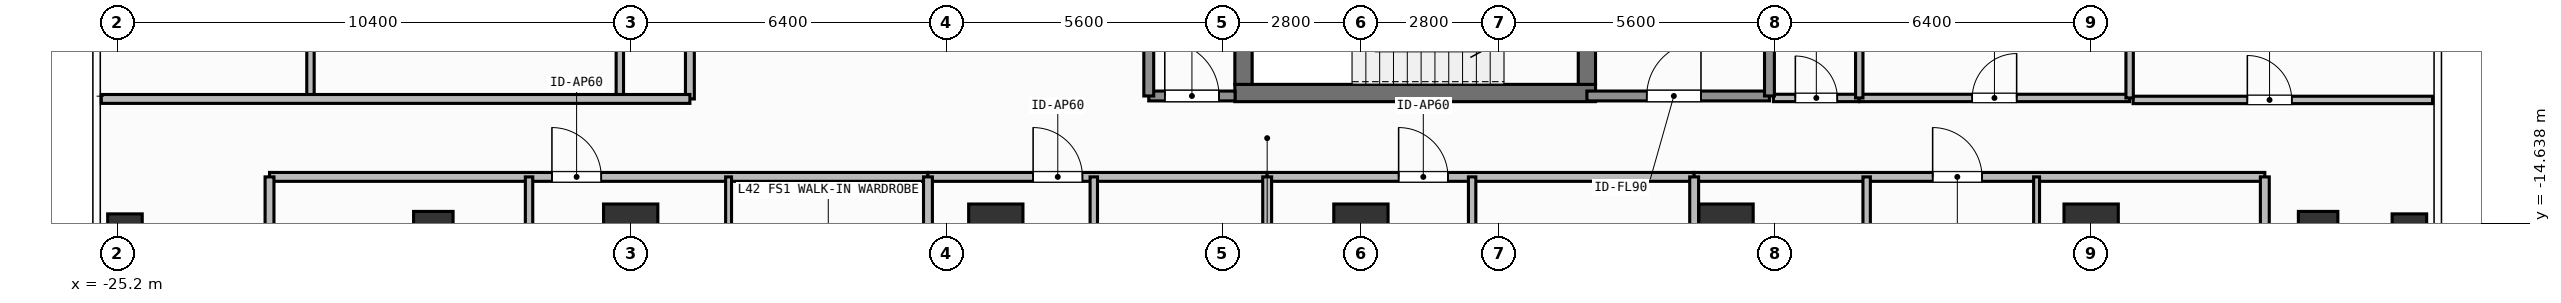
"""IFC4 building model, lengths in metres.
Left out: names, types, materials, properties, quantities, classifications, styles, units other than length and angle.
Written with IfcOpenShell. Run it as: python <this file> out.ifc"""

import sys

from ifc_helpers import new_model, si_unit, direction, frame, frame_2d, origin, origin_2d, place, context, subcontext, project, spatial, rectangle, hollow_rectangle, extrude, element, fill, save


model = new_model("IFC4")
c1 = context("Model", 3, precision=1e-05, world=origin(), true_north=direction((0.0, 1.0)))
c2 = subcontext(c1, "Body", "Model", "MODEL_VIEW")
j1 = project(units=[si_unit("LENGTHUNIT", "METRE"), si_unit("PLANEANGLEUNIT", "RADIAN")], contexts=[c1])
p1 = place(None, origin())
s1 = spatial("IfcSite", under=j1, at=p1, CompositionType="ELEMENT")
p2 = place(p1, origin())
s2 = spatial("IfcBuilding", under=s1, at=p2, CompositionType="ELEMENT")
p3 = place(p2, frame((0.0, 0.0, 171.9)))
s3 = spatial("IfcBuildingStorey", under=s2, at=p3, CompositionType="ELEMENT", Elevation=171.9)
p4 = place(p3, frame((-2.555, -12.0, 0.0), z_axis=(0.0, 0.0, 1.0), x_axis=(1.0, 0.0, 0.0)))
e1 = element("IfcWall", 1, at=p4, inside=s3, PredefinedType="SHEAR", context=c2, shape_type="SweptSolid", body=[
    extrude(rectangle(XDim=7.31, YDim=0.35, at=frame_2d((3.655, 0.0))), origin(), (0.0, 0.0, 1.0), 3.9),
])
p5 = place(p3, frame((-2.38, -11.825, 0.0), z_axis=(0.0, 0.0, 1.0), x_axis=(0.0, 1.0, 0.0)))
e2 = element("IfcWall", 2, at=p5, inside=s3, PredefinedType="SHEAR", context=c2, shape_type="SweptSolid", body=[
    extrude(rectangle(XDim=2.925, YDim=0.35, at=frame_2d((1.462, 0.0))), origin(), (0.0, 0.0, 1.0), 3.9),
])
p6 = place(p3, frame((4.58, -8.9, 0.0), z_axis=(0.0, 0.0, 1.0), x_axis=(0.0, -1.0, 0.0)))
e3 = element("IfcWall", 3, at=p6, inside=s3, PredefinedType="SHEAR", context=c2, shape_type="SweptSolid", body=[
    extrude(rectangle(XDim=2.925, YDim=0.35, at=frame_2d((1.462, 0.0))), origin(), (0.0, 0.0, 1.0), 3.9),
])
p7 = place(p6, frame((0.913, 0.0, 0.0)))
e4 = element("IfcOpeningElement", 4, at=p7, cuts=e3, PredefinedType="OPENING", context=c2, shape_type="SweptSolid", body=[
    extrude(rectangle(XDim=1.1, YDim=2.15, at=frame_2d((0.55, 1.075))), frame((0.0, 0.185, 0.0), z_axis=(0.0, -1.0, 0.0), x_axis=(1.0, 0.0, 0.0)), (0.0, 0.0, 1.0), 0.37),
])
for number, where, z_axis, x_axis in (
    (5, (-14.8, -14.8, 0.0), (0.0, 0.0, 1.0), (1.0, 0.0, 0.0)),
    (6, (-7.4, -14.8, 0.0), (0.0, 0.0, 1.0), (1.0, 0.0, 0.0)),
    (7, (0.0, -14.8, 0.0), (0.0, 0.0, 1.0), (1.0, 0.0, 0.0)),
    (8, (7.4, -14.8, 0.0), (0.0, 0.0, 1.0), (1.0, 0.0, 0.0)),
    (9, (14.8, -14.8, 0.0), (0.0, 0.0, 1.0), (1.0, 0.0, 0.0)),
):
    element("IfcColumn", number, at=place(p3, frame(where, z_axis=z_axis, x_axis=x_axis)), inside=s3, PredefinedType="COLUMN", context=c2, shape_type="SweptSolid", body=[
        extrude(rectangle(XDim=1.1, YDim=1.1, at=origin_2d()), origin(), (0.0, 0.0, 1.0), 3.9),
    ])
for number, where, z_axis, x_axis in (
    (10, (-18.8, -14.8, 0.0), (0.0, 0.0, 1.0), (1.0, 0.0, 0.0)),
    (11, (19.4, -14.8, 0.0), (0.0, 0.0, 1.0), (1.0, 0.0, 0.0)),
):
    element("IfcColumn", number, at=place(p3, frame(where, z_axis=z_axis, x_axis=x_axis)), inside=s3, PredefinedType="COLUMN", context=c2, shape_type="SweptSolid", body=[
        extrude(hollow_rectangle(XDim=0.8, YDim=0.8, WallThickness=0.036, at=origin_2d()), origin(), (0.0, 0.0, 1.0), 3.9),
    ])
for number, where, z_axis, x_axis in (
    (12, (-25.05, -14.8, 0.0), (0.0, 0.0, 1.0), (1.0, 0.0, 0.0)),
    (13, (21.25, -14.8, 0.0), (0.0, 0.0, 1.0), (1.0, 0.0, 0.0)),
):
    element("IfcColumn", number, at=place(p3, frame(where, z_axis=z_axis, x_axis=x_axis)), inside=s3, PredefinedType="COLUMN", context=c2, shape_type="SweptSolid", body=[
        extrude(hollow_rectangle(XDim=0.7, YDim=0.7, WallThickness=0.032, at=origin_2d()), origin(), (0.0, 0.0, 1.0), 3.9),
    ])
p8 = place(p3, frame((4.58, -12.06, 0.0), z_axis=(0.0, 0.0, 1.0), x_axis=(1.0, 0.0, 0.0)))
e14 = element("IfcWall", 14, at=p8, inside=s3, PredefinedType="SOLIDWALL", context=c2, shape_type="SweptSolid", body=[
    extrude(rectangle(XDim=3.7, YDim=0.2, at=frame_2d((1.85, 0.0))), origin(), (0.0, 0.0, 1.0), 3.68),
])
p9 = place(p8, frame((1.212, 0.0, 0.0)))
e15 = element("IfcOpeningElement", 15, at=p9, cuts=e14, PredefinedType="OPENING", context=c2, shape_type="SweptSolid", body=[
    extrude(rectangle(XDim=1.1, YDim=2.15, at=frame_2d((0.55, 1.075))), frame((0.0, 0.11, 0.0), z_axis=(0.0, -1.0, 0.0), x_axis=(1.0, 0.0, 0.0)), (0.0, 0.0, 1.0), 0.22),
])
p10 = place(p3, frame((-4.3, -12.06, 0.0), z_axis=(0.0, 0.0, 1.0), x_axis=(1.0, 0.0, 0.0)))
e16 = element("IfcWall", 16, at=p10, inside=s3, PredefinedType="SOLIDWALL", context=c2, shape_type="SweptSolid", body=[
    extrude(rectangle(XDim=1.75, YDim=0.2, at=frame_2d((0.875, 0.0))), origin(), (0.0, 0.0, 1.0), 3.68),
])
p11 = place(p10, frame((0.325, 0.0, 0.0)))
e17 = element("IfcOpeningElement", 17, at=p11, cuts=e16, PredefinedType="OPENING", context=c2, shape_type="SweptSolid", body=[
    extrude(rectangle(XDim=1.1, YDim=2.15, at=frame_2d((0.55, 1.075))), frame((0.0, 0.11, 0.0), z_axis=(0.0, -1.0, 0.0), x_axis=(1.0, 0.0, 0.0)), (0.0, 0.0, 1.0), 0.22),
])
p12 = place(p3, frame((8.36, -12.1, 0.0), z_axis=(0.0, 0.0, 1.0), x_axis=(1.0, 0.0, 0.0)))
e18 = element("IfcWall", 18, at=p12, inside=s3, PredefinedType="PARTITIONING", context=c2, shape_type="SweptSolid", body=[
    extrude(rectangle(XDim=1.74, YDim=0.15, at=frame_2d((0.87, 0.0))), origin(), (0.0, 0.0, 1.0), 3.68),
])
p13 = place(p12, frame((0.445, 0.0, 0.0)))
e19 = element("IfcOpeningElement", 19, at=p13, cuts=e18, PredefinedType="OPENING", context=c2, shape_type="SweptSolid", body=[
    extrude(rectangle(XDim=0.85, YDim=2.1, at=frame_2d((0.425, 1.05))), frame((0.0, 0.085, 0.0), z_axis=(0.0, -1.0, 0.0), x_axis=(1.0, 0.0, 0.0)), (0.0, 0.0, 1.0), 0.17),
])
p14 = place(p3, frame((10.1, -12.1, 0.0), z_axis=(0.0, 0.0, 1.0), x_axis=(1.0, 0.0, 0.0)))
e20 = element("IfcWall", 20, at=p14, inside=s3, PredefinedType="PARTITIONING", context=c2, shape_type="SweptSolid", body=[
    extrude(rectangle(XDim=5.48, YDim=0.15, at=frame_2d((2.74, 0.0))), origin(), (0.0, 0.0, 1.0), 3.68),
])
p15 = place(p14, frame((2.29, 0.0, 0.0)))
e21 = element("IfcOpeningElement", 21, at=p15, cuts=e20, PredefinedType="OPENING", context=c2, shape_type="SweptSolid", body=[
    extrude(rectangle(XDim=0.9, YDim=2.1, at=frame_2d((0.45, 1.05))), frame((0.0, 0.085, 0.0), z_axis=(0.0, -1.0, 0.0), x_axis=(1.0, 0.0, 0.0)), (0.0, 0.0, 1.0), 0.17),
])
p16 = place(p3, frame((-22.12, -13.7, 0.0), z_axis=(0.0, 0.0, 1.0), x_axis=(1.0, 0.0, 0.0)))
e22 = element("IfcWall", 22, at=p16, inside=s3, PredefinedType="PARTITIONING", context=c2, shape_type="SweptSolid", body=[
    extrude(rectangle(XDim=13.345, YDim=0.18, at=frame_2d((6.673, 0.0))), origin(), (0.0, 0.0, 1.0), 3.68),
])
p17 = place(p16, frame((5.724, 0.0, 0.0)))
e23 = element("IfcOpeningElement", 23, at=p17, cuts=e22, PredefinedType="OPENING", context=c2, shape_type="SweptSolid", body=[
    extrude(rectangle(XDim=1.0, YDim=2.2, at=frame_2d((0.5, 1.1))), frame((0.0, 0.1, 0.0), z_axis=(0.0, -1.0, 0.0), x_axis=(1.0, 0.0, 0.0)), (0.0, 0.0, 1.0), 0.2),
])
p18 = place(p3, frame((-16.86, -19.39, 0.0), z_axis=(0.0, 0.0, 1.0), x_axis=(0.0, 1.0, 0.0)))
e24 = element("IfcWall", 24, at=p18, inside=s3, PredefinedType="PARTITIONING", context=c2, shape_type="SweptSolid", body=[
    extrude(rectangle(XDim=5.69, YDim=0.15, at=frame_2d((2.845, 0.0))), origin(), (0.0, 0.0, 1.0), 3.68),
])
p19 = place(p18, frame((2.42, 0.0, 0.0)))
e25 = element("IfcOpeningElement", 25, at=p19, cuts=e24, PredefinedType="OPENING", context=c2, shape_type="SweptSolid", body=[
    extrude(rectangle(XDim=0.85, YDim=2.1, at=frame_2d((0.425, 1.05))), frame((0.0, 0.085, 0.0), z_axis=(0.0, -1.0, 0.0), x_axis=(1.0, 0.0, 0.0)), (0.0, 0.0, 1.0), 0.17),
])
p20 = place(p3, frame((-12.816, -17.137, 0.0), z_axis=(0.0, 0.0, 1.0), x_axis=(0.0, 1.0, 0.0)))
e26 = element("IfcWall", 26, at=p20, inside=s3, PredefinedType="PARTITIONING", context=c2, shape_type="SweptSolid", body=[
    extrude(rectangle(XDim=3.437, YDim=0.12, at=frame_2d((1.719, 0.0))), origin(), (0.0, 0.0, 1.0), 3.68),
])
p21 = place(p20, frame((0.857, 0.0, 0.0)))
e27 = element("IfcOpeningElement", 27, at=p21, cuts=e26, PredefinedType="OPENING", context=c2, shape_type="SweptSolid", body=[
    extrude(rectangle(XDim=0.85, YDim=2.1, at=frame_2d((0.425, 1.05))), frame((0.0, 0.07, 0.0), z_axis=(0.0, -1.0, 0.0), x_axis=(1.0, 0.0, 0.0)), (0.0, 0.0, 1.0), 0.14),
])
p22 = place(p3, frame((-8.775, -13.7, 0.0), z_axis=(0.0, 0.0, 1.0), x_axis=(1.0, 0.0, 0.0)))
e28 = element("IfcWall", 28, at=p22, inside=s3, PredefinedType="PARTITIONING", context=c2, shape_type="SweptSolid", body=[
    extrude(rectangle(XDim=6.875, YDim=0.18, at=frame_2d((3.438, 0.0))), origin(), (0.0, 0.0, 1.0), 3.68),
])
p23 = place(p22, frame((2.131, 0.0, 0.0)))
e29 = element("IfcOpeningElement", 29, at=p23, cuts=e28, PredefinedType="OPENING", context=c2, shape_type="SweptSolid", body=[
    extrude(rectangle(XDim=1.0, YDim=2.2, at=frame_2d((0.5, 1.1))), frame((0.0, 0.1, 0.0), z_axis=(0.0, -1.0, 0.0), x_axis=(1.0, 0.0, 0.0)), (0.0, 0.0, 1.0), 0.2),
])
p24 = place(p3, frame((-5.414, -16.829, 0.0), z_axis=(0.0, 0.0, 1.0), x_axis=(0.0, 1.0, 0.0)))
e30 = element("IfcWall", 30, at=p24, inside=s3, PredefinedType="PARTITIONING", context=c2, shape_type="SweptSolid", body=[
    extrude(rectangle(XDim=3.129, YDim=0.15, at=frame_2d((1.564, 0.0))), origin(), (0.0, 0.0, 1.0), 3.68),
])
p25 = place(p24, frame((0.516, 0.0, 0.0)))
e31 = element("IfcOpeningElement", 31, at=p25, cuts=e30, PredefinedType="OPENING", context=c2, shape_type="SweptSolid", body=[
    extrude(rectangle(XDim=0.85, YDim=2.1, at=frame_2d((0.425, 1.05))), frame((0.0, 0.085, 0.0), z_axis=(0.0, -1.0, 0.0), x_axis=(1.0, 0.0, 0.0)), (0.0, 0.0, 1.0), 0.17),
])
p26 = place(p3, frame((-1.9, -13.7, 0.0), z_axis=(0.0, 0.0, 1.0), x_axis=(1.0, 0.0, 0.0)))
e32 = element("IfcWall", 32, at=p26, inside=s3, PredefinedType="PARTITIONING", context=c2, shape_type="SweptSolid", body=[
    extrude(rectangle(XDim=8.654, YDim=0.18, at=frame_2d((4.327, 0.0))), origin(), (0.0, 0.0, 1.0), 3.68),
])
p27 = place(p26, frame((2.664, 0.0, 0.0)))
e33 = element("IfcOpeningElement", 33, at=p27, cuts=e32, PredefinedType="OPENING", context=c2, shape_type="SweptSolid", body=[
    extrude(rectangle(XDim=1.0, YDim=2.2, at=frame_2d((0.5, 1.1))), frame((0.0, 0.1, 0.0), z_axis=(0.0, -1.0, 0.0), x_axis=(1.0, 0.0, 0.0)), (0.0, 0.0, 1.0), 0.2),
])
p28 = place(p3, frame((2.254, -16.829, 0.0), z_axis=(0.0, 0.0, 1.0), x_axis=(0.0, 1.0, 0.0)))
e34 = element("IfcWall", 34, at=p28, inside=s3, PredefinedType="PARTITIONING", context=c2, shape_type="SweptSolid", body=[
    extrude(rectangle(XDim=3.129, YDim=0.15, at=frame_2d((1.564, 0.0))), origin(), (0.0, 0.0, 1.0), 3.68),
])
p29 = place(p28, frame((1.229, 0.0, 0.0)))
e35 = element("IfcOpeningElement", 35, at=p29, cuts=e34, PredefinedType="OPENING", context=c2, shape_type="SweptSolid", body=[
    extrude(rectangle(XDim=0.85, YDim=2.1, at=frame_2d((0.425, 1.05))), frame((0.0, 0.085, 0.0), z_axis=(0.0, -1.0, 0.0), x_axis=(1.0, 0.0, 0.0)), (0.0, 0.0, 1.0), 0.17),
])
p30 = place(p3, frame((6.754, -13.7, 0.0), z_axis=(0.0, 0.0, 1.0), x_axis=(1.0, 0.0, 0.0)))
e36 = element("IfcWall", 36, at=p30, inside=s3, PredefinedType="PARTITIONING", context=c2, shape_type="SweptSolid", body=[
    extrude(rectangle(XDim=11.566, YDim=0.18, at=frame_2d((5.783, 0.0))), origin(), (0.0, 0.0, 1.0), 3.68),
])
p31 = place(p30, frame((4.833, 0.0, 0.0)))
e37 = element("IfcOpeningElement", 37, at=p31, cuts=e36, PredefinedType="OPENING", context=c2, shape_type="SweptSolid", body=[
    extrude(rectangle(XDim=1.0, YDim=2.2, at=frame_2d((0.5, 1.1))), frame((0.0, 0.1, 0.0), z_axis=(0.0, -1.0, 0.0), x_axis=(1.0, 0.0, 0.0)), (0.0, 0.0, 1.0), 0.2),
])
p32 = place(p3, frame((10.25, -19.584, 0.0), z_axis=(0.0, 0.0, 1.0), x_axis=(0.0, 1.0, 0.0)))
e38 = element("IfcWall", 38, at=p32, inside=s3, PredefinedType="PARTITIONING", context=c2, shape_type="SweptSolid", body=[
    extrude(rectangle(XDim=5.884, YDim=0.15, at=frame_2d((2.942, 0.0))), origin(), (0.0, 0.0, 1.0), 3.68),
])
p33 = place(p32, frame((2.604, 0.0, 0.0)))
e39 = element("IfcOpeningElement", 39, at=p33, cuts=e38, PredefinedType="OPENING", context=c2, shape_type="SweptSolid", body=[
    extrude(rectangle(XDim=0.85, YDim=2.1, at=frame_2d((0.425, 1.05))), frame((0.0, 0.085, 0.0), z_axis=(0.0, -1.0, 0.0), x_axis=(1.0, 0.0, 0.0)), (0.0, 0.0, 1.0), 0.17),
])
p34 = place(p3, frame((13.694, -17.619, 0.0), z_axis=(0.0, 0.0, 1.0), x_axis=(0.0, 1.0, 0.0)))
e40 = element("IfcWall", 40, at=p34, inside=s3, PredefinedType="PARTITIONING", context=c2, shape_type="SweptSolid", body=[
    extrude(rectangle(XDim=3.919, YDim=0.12, at=frame_2d((1.959, 0.0))), origin(), (0.0, 0.0, 1.0), 3.68),
])
p35 = place(p34, frame((1.363, 0.0, 0.0)))
e41 = element("IfcOpeningElement", 41, at=p35, cuts=e40, PredefinedType="OPENING", context=c2, shape_type="SweptSolid", body=[
    extrude(rectangle(XDim=0.85, YDim=2.1, at=frame_2d((0.425, 1.05))), frame((0.0, 0.07, 0.0), z_axis=(0.0, -1.0, 0.0), x_axis=(1.0, 0.0, 0.0)), (0.0, 0.0, 1.0), 0.14),
])
p36 = place(p3, frame((-13.6, -12.12, 0.0), z_axis=(0.0, 0.0, 1.0), x_axis=(0.0, 1.0, 0.0)))
e42 = element("IfcWall", 42, at=p36, inside=s3, PredefinedType="PARTITIONING", context=c2, shape_type="SweptSolid", body=[
    extrude(rectangle(XDim=24.24, YDim=0.18, at=frame_2d((12.12, 0.0))), origin(), (0.0, 0.0, 1.0), 3.68),
])
p37 = place(p36, frame((11.62, 0.0, 0.0)))
e43 = element("IfcOpeningElement", 43, at=p37, cuts=e42, PredefinedType="OPENING", context=c2, shape_type="SweptSolid", body=[
    extrude(rectangle(XDim=1.0, YDim=2.2, at=frame_2d((0.5, 1.1))), frame((0.0, 0.1, 0.0), z_axis=(0.0, -1.0, 0.0), x_axis=(1.0, 0.0, 0.0)), (0.0, 0.0, 1.0), 0.2),
])
p38 = place(p3, frame((-15.02, -12.12, 0.0), z_axis=(0.0, 0.0, 1.0), x_axis=(0.0, 1.0, 0.0)))
e44 = element("IfcWall", 44, at=p38, inside=s3, PredefinedType="PARTITIONING", context=c2, shape_type="SweptSolid", body=[
    extrude(rectangle(XDim=6.684, YDim=0.15, at=frame_2d((3.342, 0.0))), origin(), (0.0, 0.0, 1.0), 3.082),
])
p39 = place(p38, frame((2.828, 0.0, 0.0)))
e45 = element("IfcOpeningElement", 45, at=p39, cuts=e44, PredefinedType="OPENING", context=c2, shape_type="SweptSolid", body=[
    extrude(rectangle(XDim=0.85, YDim=2.1, at=frame_2d((0.425, 1.05))), frame((0.0, 0.085, 0.0), z_axis=(0.0, -1.0, 0.0), x_axis=(1.0, 0.0, 0.0)), (0.0, 0.0, 1.0), 0.17),
])
p40 = place(p3, frame((15.65, -12.14, 0.0), z_axis=(0.0, 0.0, 1.0), x_axis=(1.0, 0.0, 0.0)))
e46 = element("IfcWall", 46, at=p40, inside=s3, PredefinedType="PARTITIONING", context=c2, shape_type="SweptSolid", body=[
    extrude(rectangle(XDim=6.07, YDim=0.15, at=frame_2d((3.035, 0.0))), origin(), (0.0, 0.0, 1.0), 3.68),
])
p41 = place(p40, frame((2.316, 0.0, 0.0)))
e47 = element("IfcOpeningElement", 47, at=p41, cuts=e46, PredefinedType="OPENING", context=c2, shape_type="SweptSolid", body=[
    extrude(rectangle(XDim=0.9, YDim=2.1, at=frame_2d((0.45, 1.05))), frame((0.0, 0.085, 0.0), z_axis=(0.0, -1.0, 0.0), x_axis=(1.0, 0.0, 0.0)), (0.0, 0.0, 1.0), 0.17),
])
for number, where, z_axis, x_axis in (
    (48, (8.28, -12.06, 0.0), (0.0, 0.0, 1.0), (0.0, 1.0, 0.0)),
    (49, (-4.3, -12.06, 0.0), (0.0, 0.0, 1.0), (0.0, 1.0, 0.0)),
):
    element("IfcWall", number, at=place(p3, frame(where, z_axis=z_axis, x_axis=x_axis)), inside=s3, PredefinedType="SOLIDWALL", context=c2, shape_type="SweptSolid", body=[
        extrude(rectangle(XDim=3.26, YDim=0.2, at=frame_2d((1.63, 0.0))), origin(), (0.0, 0.0, 1.0), 3.68),
    ])
p42 = place(p3, frame((10.1, -12.1, 0.0), z_axis=(0.0, 0.0, 1.0), x_axis=(0.0, 1.0, 0.0)))
e50 = element("IfcWall", 50, at=p42, inside=s3, PredefinedType="PARTITIONING", context=c2, shape_type="SweptSolid", body=[
    extrude(rectangle(XDim=2.35, YDim=0.15, at=frame_2d((1.175, 0.0))), origin(), (0.0, 0.0, 1.0), 3.68),
])
p43 = place(p3, frame((15.58, -12.1, 0.0), z_axis=(0.0, 0.0, 1.0), x_axis=(0.0, 1.0, 0.0)))
e51 = element("IfcWall", 51, at=p43, inside=s3, PredefinedType="PARTITIONING", context=c2, shape_type="SweptSolid", body=[
    extrude(rectangle(XDim=6.25, YDim=0.15, at=frame_2d((3.125, 0.0))), origin(), (0.0, 0.0, 1.0), 3.68),
])
for number, where, z_axis, x_axis in (
    (52, (-22.12, -22.51, 0.0), (0.0, 0.0, 1.0), (0.0, 1.0, 0.0)),
    (53, (18.32, -22.51, 0.0), (0.0, 0.0, 1.0), (0.0, 1.0, 0.0)),
):
    element("IfcWall", number, at=place(p3, frame(where, z_axis=z_axis, x_axis=x_axis)), inside=s3, PredefinedType="PARTITIONING", context=c2, shape_type="SweptSolid", body=[
        extrude(rectangle(XDim=8.81, YDim=0.18, at=frame_2d((4.405, 0.0))), origin(), (0.0, 0.0, 1.0), 3.68),
    ])
for number, where, z_axis, x_axis in (
    (54, (-8.775, -23.63, 0.0), (0.0, 0.0, 1.0), (0.0, 1.0, 0.0)),
    (55, (-1.9, -23.63, 0.0), (0.0, 0.0, 1.0), (0.0, 1.0, 0.0)),
    (56, (6.754, -23.63, 0.0), (0.0, 0.0, 1.0), (0.0, 1.0, 0.0)),
):
    element("IfcWall", number, at=place(p3, frame(where, z_axis=z_axis, x_axis=x_axis)), inside=s3, PredefinedType="PARTITIONING", context=c2, shape_type="SweptSolid", body=[
        extrude(rectangle(XDim=9.93, YDim=0.18, at=frame_2d((4.965, 0.0))), origin(), (0.0, 0.0, 1.0), 3.68),
    ])
p44 = place(p3, frame((-21.29, -12.12, 0.0), z_axis=(0.0, 0.0, 1.0), x_axis=(0.0, 1.0, 0.0)))
e57 = element("IfcWall", 57, at=p44, inside=s3, PredefinedType="PARTITIONING", context=c2, shape_type="SweptSolid", body=[
    extrude(rectangle(XDim=6.684, YDim=0.15, at=frame_2d((3.342, 0.0))), origin(), (0.0, 0.0, 1.0), 3.68),
])
p45 = place(p3, frame((-25.53, -12.12, 0.0), z_axis=(0.0, 0.0, 1.0), x_axis=(1.0, 0.0, 0.0)))
e58 = element("IfcWall", 58, at=p45, inside=s3, PredefinedType="PARTITIONING", context=c2, shape_type="SweptSolid", body=[
    extrude(rectangle(XDim=11.93, YDim=0.18, at=frame_2d((5.965, 0.0))), origin(), (0.0, 0.0, 1.0), 3.68),
])
p46 = place(p9, origin())
e59 = element("IfcDoor", 59, at=p46, inside=s3, OperationType="SINGLE_SWING_RIGHT", PredefinedType="DOOR", context=c2, shape_type="SweptSolid", body=[
    extrude(rectangle(XDim=1.1, YDim=2.15, at=frame_2d((0.55, 1.075))), frame((0.0, 0.025, 0.0), z_axis=(0.0, -1.0, 0.0), x_axis=(1.0, 0.0, 0.0)), (0.0, 0.0, 1.0), 0.05),
])
fill(e15, e59)
p47 = place(p11, origin())
e60 = element("IfcDoor", 60, at=p47, inside=s3, OperationType="SINGLE_SWING_LEFT", PredefinedType="DOOR", context=c2, shape_type="SweptSolid", body=[
    extrude(rectangle(XDim=1.1, YDim=2.15, at=frame_2d((0.55, 1.075))), frame((0.0, 0.025, 0.0), z_axis=(0.0, -1.0, 0.0), x_axis=(1.0, 0.0, 0.0)), (0.0, 0.0, 1.0), 0.05),
])
fill(e17, e60)
p48 = place(p13, origin())
e61 = element("IfcDoor", 61, at=p48, inside=s3, OperationType="SINGLE_SWING_LEFT", PredefinedType="DOOR", context=c2, shape_type="SweptSolid", body=[
    extrude(rectangle(XDim=0.85, YDim=2.1, at=frame_2d((0.425, 1.05))), frame((0.0, 0.025, 0.0), z_axis=(0.0, -1.0, 0.0), x_axis=(1.0, 0.0, 0.0)), (0.0, 0.0, 1.0), 0.05),
])
fill(e19, e61)
p49 = place(p15, origin())
e62 = element("IfcDoor", 62, at=p49, inside=s3, OperationType="SINGLE_SWING_RIGHT", PredefinedType="DOOR", context=c2, shape_type="SweptSolid", body=[
    extrude(rectangle(XDim=0.9, YDim=2.1, at=frame_2d((0.45, 1.05))), frame((0.0, 0.025, 0.0), z_axis=(0.0, -1.0, 0.0), x_axis=(1.0, 0.0, 0.0)), (0.0, 0.0, 1.0), 0.05),
])
fill(e21, e62)
p50 = place(p17, origin())
e63 = element("IfcDoor", 63, at=p50, inside=s3, OperationType="SINGLE_SWING_LEFT", PredefinedType="DOOR", context=c2, shape_type="SweptSolid", body=[
    extrude(rectangle(XDim=1.0, YDim=2.2, at=frame_2d((0.5, 1.1))), frame((0.0, 0.025, 0.0), z_axis=(0.0, -1.0, 0.0), x_axis=(1.0, 0.0, 0.0)), (0.0, 0.0, 1.0), 0.05),
])
fill(e23, e63)
p51 = place(p23, origin())
e64 = element("IfcDoor", 64, at=p51, inside=s3, OperationType="SINGLE_SWING_LEFT", PredefinedType="DOOR", context=c2, shape_type="SweptSolid", body=[
    extrude(rectangle(XDim=1.0, YDim=2.2, at=frame_2d((0.5, 1.1))), frame((0.0, 0.025, 0.0), z_axis=(0.0, -1.0, 0.0), x_axis=(1.0, 0.0, 0.0)), (0.0, 0.0, 1.0), 0.05),
])
fill(e29, e64)
p52 = place(p27, origin())
e65 = element("IfcDoor", 65, at=p52, inside=s3, OperationType="SINGLE_SWING_LEFT", PredefinedType="DOOR", context=c2, shape_type="SweptSolid", body=[
    extrude(rectangle(XDim=1.0, YDim=2.2, at=frame_2d((0.5, 1.1))), frame((0.0, 0.025, 0.0), z_axis=(0.0, -1.0, 0.0), x_axis=(1.0, 0.0, 0.0)), (0.0, 0.0, 1.0), 0.05),
])
fill(e33, e65)
p53 = place(p31, origin())
e66 = element("IfcDoor", 66, at=p53, inside=s3, OperationType="SINGLE_SWING_LEFT", PredefinedType="DOOR", context=c2, shape_type="SweptSolid", body=[
    extrude(rectangle(XDim=1.0, YDim=2.2, at=frame_2d((0.5, 1.1))), frame((0.0, 0.025, 0.0), z_axis=(0.0, -1.0, 0.0), x_axis=(1.0, 0.0, 0.0)), (0.0, 0.0, 1.0), 0.05),
])
fill(e37, e66)
p54 = place(p41, origin())
e67 = element("IfcDoor", 67, at=p54, inside=s3, OperationType="SINGLE_SWING_LEFT", PredefinedType="DOOR", context=c2, shape_type="SweptSolid", body=[
    extrude(rectangle(XDim=0.9, YDim=2.1, at=frame_2d((0.45, 1.05))), frame((0.0, 0.025, 0.0), z_axis=(0.0, -1.0, 0.0), x_axis=(1.0, 0.0, 0.0)), (0.0, 0.0, 1.0), 0.05),
])
fill(e47, e67)
save(model, sys.argv[1])
